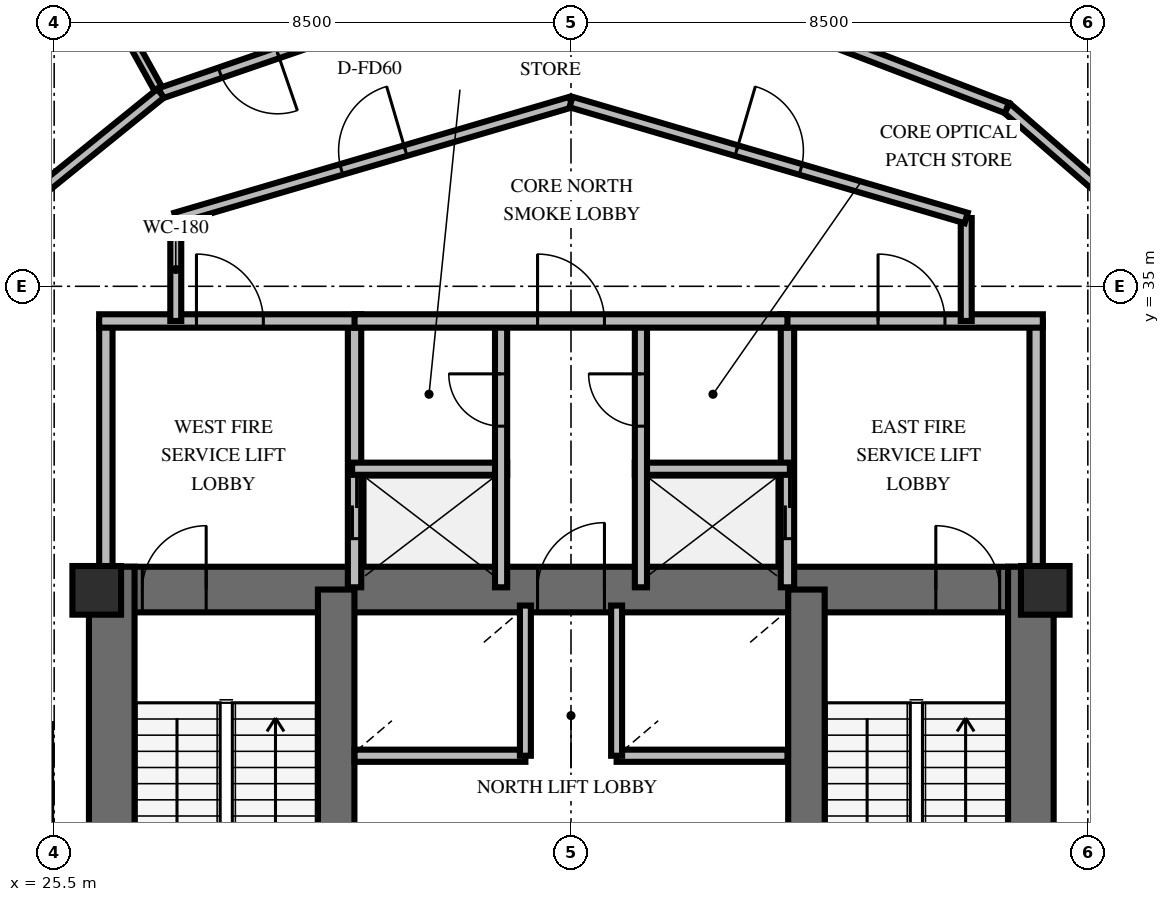
"""IFC4 building model, lengths in metres.
Left out: names, types, materials, properties, quantities, classifications, styles, units other than length and angle.
Written with IfcOpenShell. Run it as: python <this file> out.ifc"""

import sys

from ifc_helpers import new_model, si_unit, direction, frame, frame_2d, origin, origin_2d, place, context, subcontext, project, spatial, rectangle, extrude, element, fill, save


model = new_model("IFC4")
c1 = context("Model", 3, precision=1e-05, world=origin(), true_north=direction((0.0, 1.0)))
c2 = subcontext(c1, "Body", "Model", "MODEL_VIEW")
j1 = project(units=[si_unit("LENGTHUNIT", "METRE"), si_unit("PLANEANGLEUNIT", "RADIAN")], contexts=[c1])
p1 = place(None, origin())
s1 = spatial("IfcSite", under=j1, at=p1, CompositionType="ELEMENT")
p2 = place(p1, origin())
s2 = spatial("IfcBuilding", under=s1, at=p2, CompositionType="ELEMENT")
p3 = place(p2, frame((0.0, 0.0, 113.8)))
s3 = spatial("IfcBuildingStorey", under=s2, at=p3, CompositionType="ELEMENT", Elevation=113.8)
p4 = place(p3, frame((26.072, 30.013, 0.0), z_axis=(0.0, 0.0, 1.0), x_axis=(1.0, 0.0, 0.0)))
e1 = element("IfcWall", 1, at=p4, inside=s3, PredefinedType="SHEAR", context=c2, shape_type="SweptSolid", body=[
    extrude(rectangle(XDim=15.866, YDim=0.75, at=frame_2d((7.933, 0.0))), origin(), (0.0, 0.0, 1.0), 4.0),
])
p5 = place(p4, frame((0.878, 0.0, 0.0)))
e2 = element("IfcOpeningElement", 2, at=p5, cuts=e1, PredefinedType="OPENING", context=c2, shape_type="SweptSolid", body=[
    extrude(rectangle(XDim=1.05, YDim=2.15, at=frame_2d((0.525, 1.075))), frame((0.0, 0.385, 0.0), z_axis=(0.0, -1.0, 0.0), x_axis=(1.0, 0.0, 0.0)), (0.0, 0.0, 1.0), 0.77),
])
p6 = place(p4, frame((13.928, 0.0, 0.0)))
e3 = element("IfcOpeningElement", 3, at=p6, cuts=e1, PredefinedType="OPENING", context=c2, shape_type="SweptSolid", body=[
    extrude(rectangle(XDim=1.05, YDim=2.15, at=frame_2d((0.525, 1.075))), frame((0.0, 0.385, 0.0), z_axis=(0.0, -1.0, 0.0), x_axis=(1.0, 0.0, 0.0)), (0.0, 0.0, 1.0), 0.77),
])
p7 = place(p4, frame((7.378, 0.0, 0.0)))
e4 = element("IfcOpeningElement", 4, at=p7, cuts=e1, PredefinedType="OPENING", context=c2, shape_type="SweptSolid", body=[
    extrude(rectangle(XDim=1.1, YDim=2.15, at=frame_2d((0.55, 1.075))), frame((0.0, 0.385, 0.0), z_axis=(0.0, -1.0, 0.0), x_axis=(1.0, 0.0, 0.0)), (0.0, 0.0, 1.0), 0.77),
])
for number, where, z_axis, x_axis in (
    (5, (26.447, 19.812, 0.0), (0.0, 0.0, 1.0), (0.0, 1.0, 0.0)),
    (6, (41.563, 19.812, 0.0), (0.0, 0.0, 1.0), (0.0, 1.0, 0.0)),
):
    element("IfcWall", number, at=place(p3, frame(where, z_axis=z_axis, x_axis=x_axis)), inside=s3, PredefinedType="SHEAR", context=c2, shape_type="SweptSolid", body=[
        extrude(rectangle(XDim=10.576, YDim=0.75, at=frame_2d((5.288, 0.0))), origin(), (0.0, 0.0, 1.0), 4.0),
    ])
for number, where, z_axis, x_axis in (
    (7, (30.138, 20.187, 0.0), (0.0, 0.0, 1.0), (0.0, 1.0, 0.0)),
    (8, (37.872, 20.187, 0.0), (0.0, 0.0, 1.0), (0.0, 1.0, 0.0)),
):
    element("IfcWall", number, at=place(p3, frame(where, z_axis=z_axis, x_axis=x_axis)), inside=s3, PredefinedType="SHEAR", context=c2, shape_type="SweptSolid", body=[
        extrude(rectangle(XDim=9.826, YDim=0.6, at=frame_2d((4.913, 0.0))), origin(), (0.0, 0.0, 1.0), 4.0),
    ])
for number, where, z_axis, x_axis in (
    (9, (26.2, 30.0, 0.0), (0.0, 0.0, 1.0), (1.0, 0.0, 0.0)),
    (10, (41.8, 30.0, 0.0), (0.0, 0.0, 1.0), (1.0, 0.0, 0.0)),
):
    element("IfcColumn", number, at=place(p3, frame(where, z_axis=z_axis, x_axis=x_axis)), inside=s3, PredefinedType="PILASTER", context=c2, shape_type="SweptSolid", body=[
        extrude(rectangle(XDim=0.8, YDim=0.8, at=origin_2d()), origin(), (0.0, 0.0, 1.0), 4.0),
    ])
p8 = place(p3, frame((26.35, 30.05, 0.0), z_axis=(0.0, 0.0, 1.0), x_axis=(0.0, 1.0, 0.0)))
e11 = element("IfcWall", 11, at=p8, inside=s3, PredefinedType="SOLIDWALL", context=c2, shape_type="SweptSolid", body=[
    extrude(rectangle(XDim=4.38, YDim=0.22, at=frame_2d((2.19, 0.0))), origin(), (0.0, 0.0, 1.0), 2.8),
])
p9 = place(p3, frame((30.44, 30.05, 0.0), z_axis=(0.0, 0.0, 1.0), x_axis=(0.0, 1.0, 0.0)))
e12 = element("IfcWall", 12, at=p9, inside=s3, PredefinedType="SOLIDWALL", context=c2, shape_type="SweptSolid", body=[
    extrude(rectangle(XDim=4.38, YDim=0.22, at=frame_2d((2.19, 0.0))), origin(), (0.0, 0.0, 1.0), 2.8),
])
p10 = place(p9, frame((0.8, 0.0, 0.0)))
e13 = element("IfcOpeningElement", 13, at=p10, cuts=e12, PredefinedType="OPENING", context=c2, shape_type="SweptSolid", body=[
    extrude(rectangle(XDim=1.05, YDim=2.1, at=frame_2d((0.525, 1.05))), frame((0.0, 0.12, 0.0), z_axis=(0.0, -1.0, 0.0), x_axis=(1.0, 0.0, 0.0)), (0.0, 0.0, 1.0), 0.24),
])
p11 = place(p3, frame((26.24, 34.43, 0.0), z_axis=(0.0, 0.0, 1.0), x_axis=(1.0, 0.0, 0.0)))
e14 = element("IfcWall", 14, at=p11, inside=s3, PredefinedType="SOLIDWALL", context=c2, shape_type="SweptSolid", body=[
    extrude(rectangle(XDim=4.31, YDim=0.22, at=frame_2d((2.155, 0.0))), origin(), (0.0, 0.0, 1.0), 2.8),
])
p12 = place(p11, frame((1.6, 0.0, 0.0)))
e15 = element("IfcOpeningElement", 15, at=p12, cuts=e14, PredefinedType="OPENING", context=c2, shape_type="SweptSolid", body=[
    extrude(rectangle(XDim=1.1, YDim=2.15, at=frame_2d((0.55, 1.075))), frame((0.0, 0.12, 0.0), z_axis=(0.0, -1.0, 0.0), x_axis=(1.0, 0.0, 0.0)), (0.0, 0.0, 1.0), 0.24),
])
p13 = place(p3, frame((30.4, 32.0, 0.0), z_axis=(0.0, 0.0, 1.0), x_axis=(1.0, 0.0, 0.0)))
e16 = element("IfcWall", 16, at=p13, inside=s3, PredefinedType="SOLIDWALL", context=c2, shape_type="SweptSolid", body=[
    extrude(rectangle(XDim=2.55, YDim=0.2, at=frame_2d((1.275, 0.0))), origin(), (0.0, 0.0, 1.0), 2.8),
])
p14 = place(p3, frame((32.85, 30.05, 0.0), z_axis=(0.0, 0.0, 1.0), x_axis=(0.0, 1.0, 0.0)))
e17 = element("IfcWall", 17, at=p14, inside=s3, PredefinedType="SOLIDWALL", context=c2, shape_type="SweptSolid", body=[
    extrude(rectangle(XDim=4.38, YDim=0.2, at=frame_2d((2.19, 0.0))), origin(), (0.0, 0.0, 1.0), 2.8),
])
p15 = place(p14, frame((2.65, 0.0, 0.0)))
e18 = element("IfcOpeningElement", 18, at=p15, cuts=e17, PredefinedType="OPENING", context=c2, shape_type="SweptSolid", body=[
    extrude(rectangle(XDim=0.86, YDim=2.05, at=frame_2d((0.43, 1.025))), frame((0.0, 0.11, 0.0), z_axis=(0.0, -1.0, 0.0), x_axis=(1.0, 0.0, 0.0)), (0.0, 0.0, 1.0), 0.22),
])
p16 = place(p3, frame((37.56, 30.05, 0.0), z_axis=(0.0, 0.0, 1.0), x_axis=(0.0, 1.0, 0.0)))
e19 = element("IfcWall", 19, at=p16, inside=s3, PredefinedType="SOLIDWALL", context=c2, shape_type="SweptSolid", body=[
    extrude(rectangle(XDim=4.38, YDim=0.22, at=frame_2d((2.19, 0.0))), origin(), (0.0, 0.0, 1.0), 2.8),
])
p17 = place(p16, frame((0.8, 0.0, 0.0)))
e20 = element("IfcOpeningElement", 20, at=p17, cuts=e19, PredefinedType="OPENING", context=c2, shape_type="SweptSolid", body=[
    extrude(rectangle(XDim=1.05, YDim=2.1, at=frame_2d((0.525, 1.05))), frame((0.0, 0.12, 0.0), z_axis=(0.0, -1.0, 0.0), x_axis=(1.0, 0.0, 0.0)), (0.0, 0.0, 1.0), 0.24),
])
p18 = place(p3, frame((41.65, 30.05, 0.0), z_axis=(0.0, 0.0, 1.0), x_axis=(0.0, 1.0, 0.0)))
e21 = element("IfcWall", 21, at=p18, inside=s3, PredefinedType="SOLIDWALL", context=c2, shape_type="SweptSolid", body=[
    extrude(rectangle(XDim=4.38, YDim=0.22, at=frame_2d((2.19, 0.0))), origin(), (0.0, 0.0, 1.0), 2.8),
])
p19 = place(p3, frame((37.45, 34.43, 0.0), z_axis=(0.0, 0.0, 1.0), x_axis=(1.0, 0.0, 0.0)))
e22 = element("IfcWall", 22, at=p19, inside=s3, PredefinedType="SOLIDWALL", context=c2, shape_type="SweptSolid", body=[
    extrude(rectangle(XDim=4.31, YDim=0.22, at=frame_2d((2.155, 0.0))), origin(), (0.0, 0.0, 1.0), 2.8),
])
p20 = place(p19, frame((1.6, 0.0, 0.0)))
e23 = element("IfcOpeningElement", 23, at=p20, cuts=e22, PredefinedType="OPENING", context=c2, shape_type="SweptSolid", body=[
    extrude(rectangle(XDim=1.1, YDim=2.15, at=frame_2d((0.55, 1.075))), frame((0.0, 0.12, 0.0), z_axis=(0.0, -1.0, 0.0), x_axis=(1.0, 0.0, 0.0)), (0.0, 0.0, 1.0), 0.24),
])
p21 = place(p3, frame((35.05, 32.0, 0.0), z_axis=(0.0, 0.0, 1.0), x_axis=(1.0, 0.0, 0.0)))
e24 = element("IfcWall", 24, at=p21, inside=s3, PredefinedType="SOLIDWALL", context=c2, shape_type="SweptSolid", body=[
    extrude(rectangle(XDim=2.55, YDim=0.2, at=frame_2d((1.275, 0.0))), origin(), (0.0, 0.0, 1.0), 2.8),
])
p22 = place(p3, frame((35.15, 30.05, 0.0), z_axis=(0.0, 0.0, 1.0), x_axis=(0.0, 1.0, 0.0)))
e25 = element("IfcWall", 25, at=p22, inside=s3, PredefinedType="SOLIDWALL", context=c2, shape_type="SweptSolid", body=[
    extrude(rectangle(XDim=4.38, YDim=0.2, at=frame_2d((2.19, 0.0))), origin(), (0.0, 0.0, 1.0), 2.8),
])
p23 = place(p22, frame((2.65, 0.0, 0.0)))
e26 = element("IfcOpeningElement", 26, at=p23, cuts=e25, PredefinedType="OPENING", context=c2, shape_type="SweptSolid", body=[
    extrude(rectangle(XDim=0.86, YDim=2.05, at=frame_2d((0.43, 1.025))), frame((0.0, 0.11, 0.0), z_axis=(0.0, -1.0, 0.0), x_axis=(1.0, 0.0, 0.0)), (0.0, 0.0, 1.0), 0.22),
])
p24 = place(p3, frame((30.44, 34.43, 0.0), z_axis=(0.0, 0.0, 1.0), x_axis=(1.0, 0.0, 0.0)))
e27 = element("IfcWall", 27, at=p24, inside=s3, PredefinedType="SOLIDWALL", context=c2, shape_type="SweptSolid", body=[
    extrude(rectangle(XDim=7.12, YDim=0.22, at=frame_2d((3.56, 0.0))), origin(), (0.0, 0.0, 1.0), 2.8),
])
p25 = place(p24, frame((3.01, 0.0, 0.0)))
e28 = element("IfcOpeningElement", 28, at=p25, cuts=e27, PredefinedType="OPENING", context=c2, shape_type="SweptSolid", body=[
    extrude(rectangle(XDim=1.1, YDim=2.15, at=frame_2d((0.55, 1.075))), frame((0.0, 0.12, 0.0), z_axis=(0.0, -1.0, 0.0), x_axis=(1.0, 0.0, 0.0)), (0.0, 0.0, 1.0), 0.24),
])
p26 = place(p3, frame((30.44, 27.28, 0.0), z_axis=(0.0, 0.0, 1.0), x_axis=(1.0, 0.0, 0.0)))
e29 = element("IfcWall", 29, at=p26, inside=s3, PredefinedType="SOLIDWALL", context=c2, shape_type="SweptSolid", body=[
    extrude(rectangle(XDim=2.81, YDim=0.2, at=frame_2d((1.405, 0.0))), origin(), (0.0, 0.0, 1.0), 2.8),
])
p27 = place(p3, frame((33.25, 27.28, 0.0), z_axis=(0.0, 0.0, 1.0), x_axis=(0.0, 1.0, 0.0)))
e30 = element("IfcWall", 30, at=p27, inside=s3, PredefinedType="SOLIDWALL", context=c2, shape_type="SweptSolid", body=[
    extrude(rectangle(XDim=2.47, YDim=0.18, at=frame_2d((1.235, 0.0))), origin(), (0.0, 0.0, 1.0), 2.8),
])
p28 = place(p3, frame((34.75, 27.28, 0.0), z_axis=(0.0, 0.0, 1.0), x_axis=(1.0, 0.0, 0.0)))
e31 = element("IfcWall", 31, at=p28, inside=s3, PredefinedType="SOLIDWALL", context=c2, shape_type="SweptSolid", body=[
    extrude(rectangle(XDim=2.81, YDim=0.2, at=frame_2d((1.405, 0.0))), origin(), (0.0, 0.0, 1.0), 2.8),
])
p29 = place(p3, frame((34.75, 27.28, 0.0), z_axis=(0.0, 0.0, 1.0), x_axis=(0.0, 1.0, 0.0)))
e32 = element("IfcWall", 32, at=p29, inside=s3, PredefinedType="SOLIDWALL", context=c2, shape_type="SweptSolid", body=[
    extrude(rectangle(XDim=2.47, YDim=0.18, at=frame_2d((1.235, 0.0))), origin(), (0.0, 0.0, 1.0), 2.8),
])
for number, where, z_axis, x_axis in (
    (33, (27.5, 34.43, 0.0), (0.0, 0.0, 1.0), (0.0, 1.0, 0.0)),
    (34, (40.5, 36.123, 0.0), (0.0, 0.0, 1.0), (0.0, -1.0, 0.0)),
):
    element("IfcWall", number, at=place(p3, frame(where, z_axis=z_axis, x_axis=x_axis)), inside=s3, PredefinedType="PARTITIONING", context=c2, shape_type="SweptSolid", body=[
        extrude(rectangle(XDim=1.693, YDim=0.18, at=frame_2d((0.846, 0.0))), origin(), (0.0, 0.0, 1.0), 2.8),
    ])
p30 = place(p3, frame((27.5, 36.123, 0.0), z_axis=(0.0, 0.0, 1.0), x_axis=(0.959546654541, 0.281549671923, 0.0)))
e35 = element("IfcWall", 35, at=p30, inside=s3, PredefinedType="PARTITIONING", context=c2, shape_type="SweptSolid", body=[
    extrude(rectangle(XDim=6.774, YDim=0.18, at=frame_2d((3.387, 0.0))), origin(), (0.0, 0.0, 1.0), 2.8),
])
p31 = place(p30, frame((2.837, 0.0, 0.0)))
e36 = element("IfcOpeningElement", 36, at=p31, cuts=e35, PredefinedType="OPENING", context=c2, shape_type="SweptSolid", body=[
    extrude(rectangle(XDim=1.1, YDim=2.15, at=frame_2d((0.55, 1.075))), frame((0.0, 0.1, 0.0), z_axis=(0.0, -1.0, 0.0), x_axis=(1.0, 0.0, 0.0)), (0.0, 0.0, 1.0), 0.2),
])
p32 = place(p3, frame((34.0, 38.03, 0.0), z_axis=(0.0, 0.0, 1.0), x_axis=(0.959546654541, -0.281549671923, 0.0)))
e37 = element("IfcWall", 37, at=p32, inside=s3, PredefinedType="PARTITIONING", context=c2, shape_type="SweptSolid", body=[
    extrude(rectangle(XDim=6.774, YDim=0.18, at=frame_2d((3.387, 0.0))), origin(), (0.0, 0.0, 1.0), 2.8),
])
p33 = place(p32, frame((2.837, 0.0, 0.0)))
e38 = element("IfcOpeningElement", 38, at=p33, cuts=e37, PredefinedType="OPENING", context=c2, shape_type="SweptSolid", body=[
    extrude(rectangle(XDim=1.1, YDim=2.15, at=frame_2d((0.55, 1.075))), frame((0.0, 0.1, 0.0), z_axis=(0.0, -1.0, 0.0), x_axis=(1.0, 0.0, 0.0)), (0.0, 0.0, 1.0), 0.2),
])
p34 = place(p3, frame((44.818, 34.76, 0.0), z_axis=(0.0, 0.0, 1.0), x_axis=(-0.754696835755, 0.656073689537, 0.0)))
e39 = element("IfcWall", 39, at=p34, inside=s3, PredefinedType="PARTITIONING", context=c2, shape_type="SweptSolid", body=[
    extrude(rectangle(XDim=4.835, YDim=0.18, at=frame_2d((2.417, 0.0))), origin(), (0.0, 0.0, 1.0), 2.8),
])
p35 = place(p34, frame((1.034, 0.0, 0.0)))
e40 = element("IfcOpeningElement", 40, at=p35, cuts=e39, PredefinedType="OPENING", context=c2, shape_type="SweptSolid", body=[
    extrude(rectangle(XDim=1.0, YDim=2.15, at=frame_2d((0.5, 1.075))), frame((0.0, 0.1, 0.0), z_axis=(0.0, -1.0, 0.0), x_axis=(1.0, 0.0, 0.0)), (0.0, 0.0, 1.0), 0.2),
])
p36 = place(p3, frame((41.169, 37.932, 0.0), z_axis=(0.0, 0.0, 1.0), x_axis=(-0.933582294394, 0.35836308347, 0.0)))
e41 = element("IfcWall", 41, at=p36, inside=s3, PredefinedType="PARTITIONING", context=c2, shape_type="SweptSolid", body=[
    extrude(rectangle(XDim=4.834, YDim=0.18, at=frame_2d((2.417, 0.0))), origin(), (0.0, 0.0, 1.0), 2.8),
])
p37 = place(p3, frame((27.251, 38.175, 0.0), z_axis=(0.0, 0.0, 1.0), x_axis=(-0.484806879047, 0.874621226605, 0.0)))
e42 = element("IfcWall", 42, at=p37, inside=s3, PredefinedType="PARTITIONING", context=c2, shape_type="SweptSolid", body=[
    extrude(rectangle(XDim=5.803, YDim=0.14, at=frame_2d((2.902, 0.0))), origin(), (0.0, 0.0, 1.0), 2.8),
])
p38 = place(p3, frame((31.823, 39.749, 0.0), z_axis=(0.0, 0.0, 1.0), x_axis=(-0.945531725064, -0.325529963134, 0.0)))
e43 = element("IfcWall", 43, at=p38, inside=s3, PredefinedType="PARTITIONING", context=c2, shape_type="SweptSolid", body=[
    extrude(rectangle(XDim=4.834, YDim=0.18, at=frame_2d((2.417, 0.0))), origin(), (0.0, 0.0, 1.0), 2.8),
])
p39 = place(p38, frame((2.801, 0.0, 0.0)))
e44 = element("IfcOpeningElement", 44, at=p39, cuts=e43, PredefinedType="OPENING", context=c2, shape_type="SweptSolid", body=[
    extrude(rectangle(XDim=1.0, YDim=2.15, at=frame_2d((0.5, 1.075))), frame((0.0, 0.1, 0.0), z_axis=(0.0, -1.0, 0.0), x_axis=(1.0, 0.0, 0.0)), (0.0, 0.0, 1.0), 0.2),
])
p40 = place(p3, frame((27.251, 38.175, 0.0), z_axis=(0.0, 0.0, 1.0), x_axis=(-0.777140194095, -0.629327513082, 0.0)))
e45 = element("IfcWall", 45, at=p40, inside=s3, PredefinedType="PARTITIONING", context=c2, shape_type="SweptSolid", body=[
    extrude(rectangle(XDim=4.834, YDim=0.18, at=frame_2d((2.417, 0.0))), origin(), (0.0, 0.0, 1.0), 2.8),
])
p41 = place(p40, frame((2.801, 0.0, 0.0)))
e46 = element("IfcOpeningElement", 46, at=p41, cuts=e45, PredefinedType="OPENING", context=c2, shape_type="SweptSolid", body=[
    extrude(rectangle(XDim=1.0, YDim=2.15, at=frame_2d((0.5, 1.075))), frame((0.0, 0.1, 0.0), z_axis=(0.0, -1.0, 0.0), x_axis=(1.0, 0.0, 0.0)), (0.0, 0.0, 1.0), 0.2),
])
p42 = place(p5, origin())
e47 = element("IfcDoor", 47, at=p42, inside=s3, OperationType="SINGLE_SWING_RIGHT", PredefinedType="DOOR", context=c2, shape_type="SweptSolid", body=[
    extrude(rectangle(XDim=1.05, YDim=2.15, at=frame_2d((0.525, 1.075))), frame((0.0, 0.025, 0.0), z_axis=(0.0, -1.0, 0.0), x_axis=(1.0, 0.0, 0.0)), (0.0, 0.0, 1.0), 0.05),
])
fill(e2, e47)
p43 = place(p6, origin())
e48 = element("IfcDoor", 48, at=p43, inside=s3, OperationType="SINGLE_SWING_LEFT", PredefinedType="DOOR", context=c2, shape_type="SweptSolid", body=[
    extrude(rectangle(XDim=1.05, YDim=2.15, at=frame_2d((0.525, 1.075))), frame((0.0, 0.025, 0.0), z_axis=(0.0, -1.0, 0.0), x_axis=(1.0, 0.0, 0.0)), (0.0, 0.0, 1.0), 0.05),
])
fill(e3, e48)
p44 = place(p7, origin())
e49 = element("IfcDoor", 49, at=p44, inside=s3, OperationType="SINGLE_SWING_RIGHT", PredefinedType="DOOR", context=c2, shape_type="SweptSolid", body=[
    extrude(rectangle(XDim=1.1, YDim=2.15, at=frame_2d((0.55, 1.075))), frame((0.0, 0.025, 0.0), z_axis=(0.0, -1.0, 0.0), x_axis=(1.0, 0.0, 0.0)), (0.0, 0.0, 1.0), 0.05),
])
fill(e4, e49)
p45 = place(p12, origin())
e50 = element("IfcDoor", 50, at=p45, inside=s3, OperationType="SINGLE_SWING_LEFT", PredefinedType="DOOR", context=c2, shape_type="SweptSolid", body=[
    extrude(rectangle(XDim=1.1, YDim=2.15, at=frame_2d((0.55, 1.075))), frame((0.0, 0.025, 0.0), z_axis=(0.0, -1.0, 0.0), x_axis=(1.0, 0.0, 0.0)), (0.0, 0.0, 1.0), 0.05),
])
fill(e15, e50)
p46 = place(p10, origin())
e51 = element("IfcDoor", 51, at=p46, inside=s3, OperationType="DOUBLE_DOOR_SLIDING", PredefinedType="USERDEFINED", context=c2, shape_type="SweptSolid", body=[
    extrude(rectangle(XDim=1.05, YDim=2.1, at=frame_2d((0.525, 1.05))), frame((0.0, 0.025, 0.0), z_axis=(0.0, -1.0, 0.0), x_axis=(1.0, 0.0, 0.0)), (0.0, 0.0, 1.0), 0.05),
])
fill(e13, e51)
p47 = place(p15, origin())
e52 = element("IfcDoor", 52, at=p47, inside=s3, OperationType="SINGLE_SWING_RIGHT", PredefinedType="TRAPDOOR", context=c2, shape_type="SweptSolid", body=[
    extrude(rectangle(XDim=0.86, YDim=2.05, at=frame_2d((0.43, 1.025))), frame((0.0, 0.025, 0.0), z_axis=(0.0, -1.0, 0.0), x_axis=(1.0, 0.0, 0.0)), (0.0, 0.0, 1.0), 0.05),
])
fill(e18, e52)
p48 = place(p20, origin())
e53 = element("IfcDoor", 53, at=p48, inside=s3, OperationType="SINGLE_SWING_LEFT", PredefinedType="DOOR", context=c2, shape_type="SweptSolid", body=[
    extrude(rectangle(XDim=1.1, YDim=2.15, at=frame_2d((0.55, 1.075))), frame((0.0, 0.025, 0.0), z_axis=(0.0, -1.0, 0.0), x_axis=(1.0, 0.0, 0.0)), (0.0, 0.0, 1.0), 0.05),
])
fill(e23, e53)
p49 = place(p17, origin())
e54 = element("IfcDoor", 54, at=p49, inside=s3, OperationType="DOUBLE_DOOR_SLIDING", PredefinedType="USERDEFINED", context=c2, shape_type="SweptSolid", body=[
    extrude(rectangle(XDim=1.05, YDim=2.1, at=frame_2d((0.525, 1.05))), frame((0.0, 0.025, 0.0), z_axis=(0.0, -1.0, 0.0), x_axis=(1.0, 0.0, 0.0)), (0.0, 0.0, 1.0), 0.05),
])
fill(e20, e54)
p50 = place(p23, origin())
e55 = element("IfcDoor", 55, at=p50, inside=s3, OperationType="SINGLE_SWING_RIGHT", PredefinedType="TRAPDOOR", context=c2, shape_type="SweptSolid", body=[
    extrude(rectangle(XDim=0.86, YDim=2.05, at=frame_2d((0.43, 1.025))), frame((0.0, 0.025, 0.0), z_axis=(0.0, -1.0, 0.0), x_axis=(1.0, 0.0, 0.0)), (0.0, 0.0, 1.0), 0.05),
])
fill(e26, e55)
p51 = place(p25, origin())
e56 = element("IfcDoor", 56, at=p51, inside=s3, OperationType="SINGLE_SWING_LEFT", PredefinedType="DOOR", context=c2, shape_type="SweptSolid", body=[
    extrude(rectangle(XDim=1.1, YDim=2.15, at=frame_2d((0.55, 1.075))), frame((0.0, 0.025, 0.0), z_axis=(0.0, -1.0, 0.0), x_axis=(1.0, 0.0, 0.0)), (0.0, 0.0, 1.0), 0.05),
])
fill(e28, e56)
p52 = place(p31, origin())
e57 = element("IfcDoor", 57, at=p52, inside=s3, OperationType="SINGLE_SWING_RIGHT", PredefinedType="DOOR", context=c2, shape_type="SweptSolid", body=[
    extrude(rectangle(XDim=1.1, YDim=2.15, at=frame_2d((0.55, 1.075))), frame((0.0, 0.025, 0.0), z_axis=(0.0, -1.0, 0.0), x_axis=(1.0, 0.0, 0.0)), (0.0, 0.0, 1.0), 0.05),
])
fill(e36, e57)
p53 = place(p33, origin())
e58 = element("IfcDoor", 58, at=p53, inside=s3, OperationType="SINGLE_SWING_LEFT", PredefinedType="DOOR", context=c2, shape_type="SweptSolid", body=[
    extrude(rectangle(XDim=1.1, YDim=2.15, at=frame_2d((0.55, 1.075))), frame((0.0, 0.025, 0.0), z_axis=(0.0, -1.0, 0.0), x_axis=(1.0, 0.0, 0.0)), (0.0, 0.0, 1.0), 0.05),
])
fill(e38, e58)
p54 = place(p39, origin())
e59 = element("IfcDoor", 59, at=p54, inside=s3, OperationType="SINGLE_SWING_LEFT", PredefinedType="DOOR", context=c2, shape_type="SweptSolid", body=[
    extrude(rectangle(XDim=1.0, YDim=2.15, at=frame_2d((0.5, 1.075))), frame((0.0, 0.025, 0.0), z_axis=(0.0, -1.0, 0.0), x_axis=(1.0, 0.0, 0.0)), (0.0, 0.0, 1.0), 0.05),
])
fill(e44, e59)
save(model, sys.argv[1])
